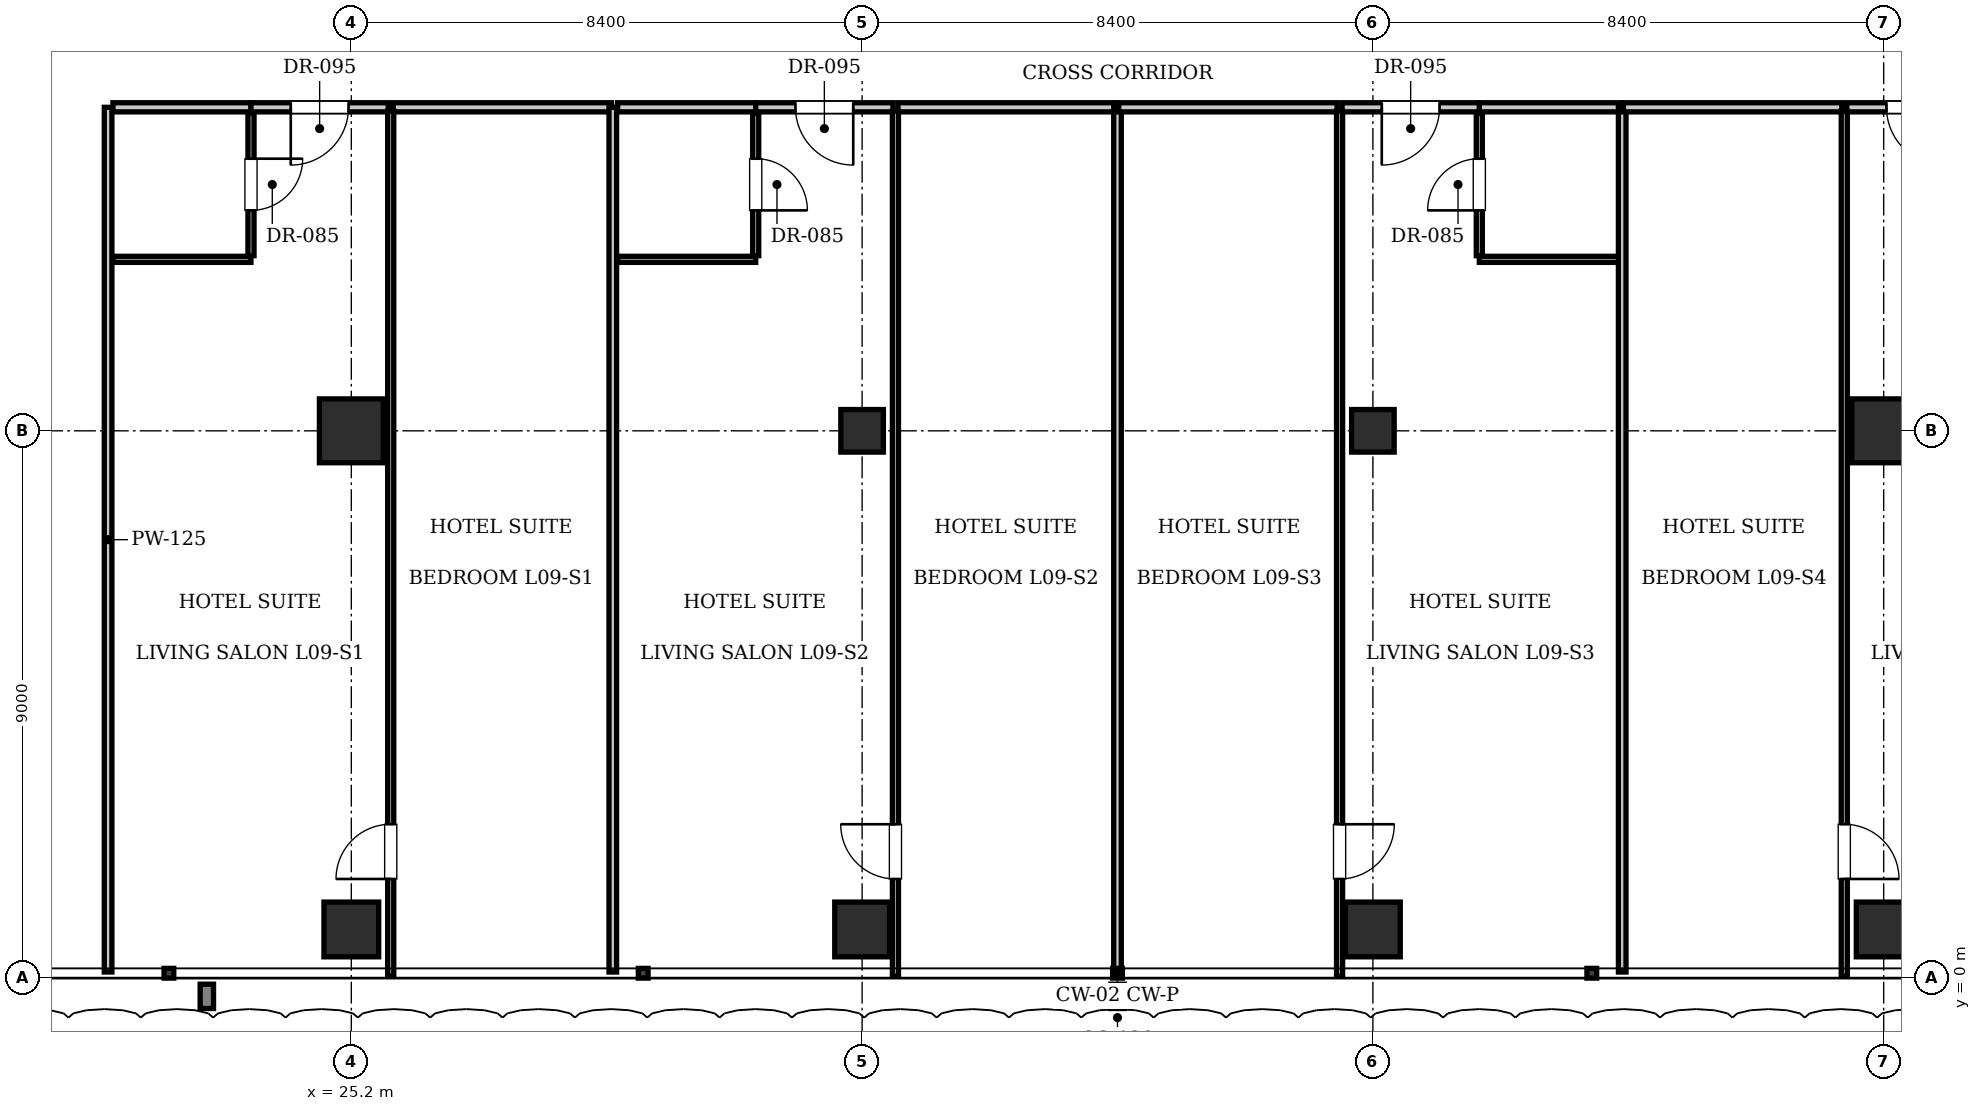
"""IFC4 building model, lengths in metres.
Left out: names, types, materials, properties, quantities, classifications, styles, units other than length and angle.
Written with IfcOpenShell. Run it as: python <this file> out.ifc"""

import sys

from ifc_helpers import new_model, si_unit, direction, frame, frame_2d, origin, origin_2d, place, context, subcontext, project, spatial, rectangle, i_section, extrude, element, fill, save


model = new_model("IFC4")
c1 = context("Model", 3, precision=1e-05, world=origin(), true_north=direction((0.0, 1.0)))
c2 = subcontext(c1, "Body", "Model", "MODEL_VIEW")
j1 = project(units=[si_unit("LENGTHUNIT", "METRE"), si_unit("PLANEANGLEUNIT", "RADIAN")], contexts=[c1])
p1 = place(None, origin())
s1 = spatial("IfcSite", under=j1, at=p1, CompositionType="ELEMENT")
p2 = place(p1, origin())
s2 = spatial("IfcBuilding", under=s1, at=p2, CompositionType="ELEMENT")
p3 = place(p2, frame((0.0, 0.0, 42.35)))
s3 = spatial("IfcBuildingStorey", under=s2, at=p3, CompositionType="ELEMENT", Elevation=42.35)
for number, where, z_axis, x_axis in (
    (1, (25.2, 9.0, 0.0), (0.0, 0.0, 1.0), (1.0, 0.0, 0.0)),
    (2, (50.4, 9.0, 0.0), (0.0, 0.0, 1.0), (1.0, 0.0, 0.0)),
):
    element("IfcColumn", number, at=place(p3, frame(where, z_axis=z_axis, x_axis=x_axis)), inside=s3, PredefinedType="COLUMN", context=c2, shape_type="SweptSolid", body=[
        extrude(rectangle(XDim=1.05, YDim=1.05, at=origin_2d()), origin(), (0.0, 0.0, 1.0), 3.85),
    ])
for number, where, z_axis, x_axis in (
    (3, (33.6, 9.0, 0.0), (0.0, 0.0, 1.0), (1.0, 0.0, 0.0)),
    (4, (42.0, 9.0, 0.0), (0.0, 0.0, 1.0), (1.0, 0.0, 0.0)),
):
    element("IfcColumn", number, at=place(p3, frame(where, z_axis=z_axis, x_axis=x_axis)), inside=s3, PredefinedType="COLUMN", context=c2, shape_type="SweptSolid", body=[
        extrude(i_section(OverallWidth=0.7, OverallDepth=0.7, WebThickness=0.028, FlangeThickness=0.044, at=origin_2d()), origin(), (0.0, 0.0, 1.0), 3.85),
    ])
for number, where, z_axis, x_axis in (
    (5, (25.2, 0.8, 0.0), (0.0, 0.0, 1.0), (1.0, 0.0, 0.0)),
    (6, (33.6, 0.8, 0.0), (0.0, 0.0, 1.0), (1.0, 0.0, 0.0)),
    (7, (42.0, 0.8, 0.0), (0.0, 0.0, 1.0), (1.0, 0.0, 0.0)),
    (8, (50.4, 0.8, 0.0), (0.0, 0.0, 1.0), (1.0, 0.0, 0.0)),
):
    element("IfcColumn", number, at=place(p3, frame(where, z_axis=z_axis, x_axis=x_axis)), inside=s3, PredefinedType="COLUMN", context=c2, shape_type="SweptSolid", body=[
        extrude(rectangle(XDim=0.9, YDim=0.9, at=origin_2d()), origin(), (0.0, 0.0, 1.0), 3.85),
    ])
p4 = place(p3, frame((21.2, 0.1, 0.0), z_axis=(0.0, 0.0, 1.0), x_axis=(0.0, 1.0, 0.0)))
e9 = element("IfcWall", 9, at=p4, inside=s3, PredefinedType="PARTITIONING", context=c2, shape_type="SweptSolid", body=[
    extrude(rectangle(XDim=14.22, YDim=0.125, at=frame_2d((7.11, 0.0))), origin(), (0.0, 0.0, 1.0), 3.61),
])
p5 = place(p3, frame((21.28, 14.32, 0.0), z_axis=(0.0, 0.0, 1.0), x_axis=(1.0, 0.0, 0.0)))
e10 = element("IfcWall", 10, at=p5, inside=s3, PredefinedType="PARTITIONING", context=c2, shape_type="SweptSolid", body=[
    extrude(rectangle(XDim=2.27, YDim=0.15, at=frame_2d((1.135, 0.0))), origin(), (0.0, 0.0, 1.0), 3.61),
])
p6 = place(p3, frame((21.28, 11.82, 0.0), z_axis=(0.0, 0.0, 1.0), x_axis=(1.0, 0.0, 0.0)))
e11 = element("IfcWall", 11, at=p6, inside=s3, PredefinedType="PARTITIONING", context=c2, shape_type="SweptSolid", body=[
    extrude(rectangle(XDim=2.27, YDim=0.1, at=frame_2d((1.135, 0.0))), origin(), (0.0, 0.0, 1.0), 3.61),
])
p7 = place(p3, frame((23.55, 11.88, 0.0), z_axis=(0.0, 0.0, 1.0), x_axis=(0.0, 1.0, 0.0)))
e12 = element("IfcWall", 12, at=p7, inside=s3, PredefinedType="PARTITIONING", context=c2, shape_type="SweptSolid", body=[
    extrude(rectangle(XDim=2.34, YDim=0.1, at=frame_2d((1.17, 0.0))), origin(), (0.0, 0.0, 1.0), 3.61),
])
p8 = place(p7, frame((0.745, 0.0, 0.0)))
e13 = element("IfcOpeningElement", 13, at=p8, cuts=e12, PredefinedType="OPENING", context=c2, shape_type="SweptSolid", body=[
    extrude(rectangle(XDim=0.85, YDim=2.1, at=frame_2d((0.425, 1.05))), frame((0.0, 0.06, 0.0), z_axis=(0.0, -1.0, 0.0), x_axis=(1.0, 0.0, 0.0)), (0.0, 0.0, 1.0), 0.12),
])
p9 = place(p3, frame((23.55, 14.32, 0.0), z_axis=(0.0, 0.0, 1.0), x_axis=(1.0, 0.0, 0.0)))
e14 = element("IfcWall", 14, at=p9, inside=s3, PredefinedType="PARTITIONING", context=c2, shape_type="SweptSolid", body=[
    extrude(rectangle(XDim=2.258, YDim=0.15, at=frame_2d((1.129, 0.0))), origin(), (0.0, 0.0, 1.0), 3.61),
])
p10 = place(p9, frame((0.654, 0.0, 0.0)))
e15 = element("IfcOpeningElement", 15, at=p10, cuts=e14, PredefinedType="OPENING", context=c2, shape_type="SweptSolid", body=[
    extrude(rectangle(XDim=0.95, YDim=2.15, at=frame_2d((0.475, 1.075))), frame((0.0, 0.085, 0.0), z_axis=(0.0, -1.0, 0.0), x_axis=(1.0, 0.0, 0.0)), (0.0, 0.0, 1.0), 0.17),
])
p11 = place(p3, frame((25.888, 14.32, 0.0), z_axis=(0.0, 0.0, 1.0), x_axis=(1.0, 0.0, 0.0)))
e16 = element("IfcWall", 16, at=p11, inside=s3, PredefinedType="PARTITIONING", context=c2, shape_type="SweptSolid", body=[
    extrude(rectangle(XDim=3.592, YDim=0.15, at=frame_2d((1.796, 0.0))), origin(), (0.0, 0.0, 1.0), 3.61),
])
p12 = place(p3, frame((25.848, 0.03, 0.0), z_axis=(0.0, 0.0, 1.0), x_axis=(0.0, 1.0, 0.0)))
e17 = element("IfcWall", 17, at=p12, inside=s3, PredefinedType="PARTITIONING", context=c2, shape_type="SweptSolid", body=[
    extrude(rectangle(XDim=14.23, YDim=0.1, at=frame_2d((7.115, 0.0))), origin(), (0.0, 0.0, 1.0), 3.61),
])
p13 = place(p12, frame((1.6, 0.0, 0.0)))
e18 = element("IfcOpeningElement", 18, at=p13, cuts=e17, PredefinedType="OPENING", context=c2, shape_type="SweptSolid", body=[
    extrude(rectangle(XDim=0.9, YDim=2.1, at=frame_2d((0.45, 1.05))), frame((0.0, 0.06, 0.0), z_axis=(0.0, -1.0, 0.0), x_axis=(1.0, 0.0, 0.0)), (0.0, 0.0, 1.0), 0.12),
])
p14 = place(p3, frame((29.5, 0.1, 0.0), z_axis=(0.0, 0.0, 1.0), x_axis=(0.0, 1.0, 0.0)))
e19 = element("IfcWall", 19, at=p14, inside=s3, PredefinedType="PARTITIONING", context=c2, shape_type="SweptSolid", body=[
    extrude(rectangle(XDim=14.22, YDim=0.125, at=frame_2d((7.11, 0.0))), origin(), (0.0, 0.0, 1.0), 3.207),
])
p15 = place(p3, frame((29.58, 14.32, 0.0), z_axis=(0.0, 0.0, 1.0), x_axis=(1.0, 0.0, 0.0)))
e20 = element("IfcWall", 20, at=p15, inside=s3, PredefinedType="PARTITIONING", context=c2, shape_type="SweptSolid", body=[
    extrude(rectangle(XDim=2.27, YDim=0.15, at=frame_2d((1.135, 0.0))), origin(), (0.0, 0.0, 1.0), 3.61),
])
p16 = place(p3, frame((29.58, 11.82, 0.0), z_axis=(0.0, 0.0, 1.0), x_axis=(1.0, 0.0, 0.0)))
e21 = element("IfcWall", 21, at=p16, inside=s3, PredefinedType="PARTITIONING", context=c2, shape_type="SweptSolid", body=[
    extrude(rectangle(XDim=2.27, YDim=0.1, at=frame_2d((1.135, 0.0))), origin(), (0.0, 0.0, 1.0), 3.61),
])
p17 = place(p3, frame((31.85, 11.88, 0.0), z_axis=(0.0, 0.0, 1.0), x_axis=(0.0, 1.0, 0.0)))
e22 = element("IfcWall", 22, at=p17, inside=s3, PredefinedType="PARTITIONING", context=c2, shape_type="SweptSolid", body=[
    extrude(rectangle(XDim=2.34, YDim=0.1, at=frame_2d((1.17, 0.0))), origin(), (0.0, 0.0, 1.0), 3.61),
])
p18 = place(p17, frame((0.745, 0.0, 0.0)))
e23 = element("IfcOpeningElement", 23, at=p18, cuts=e22, PredefinedType="OPENING", context=c2, shape_type="SweptSolid", body=[
    extrude(rectangle(XDim=0.85, YDim=2.1, at=frame_2d((0.425, 1.05))), frame((0.0, 0.06, 0.0), z_axis=(0.0, -1.0, 0.0), x_axis=(1.0, 0.0, 0.0)), (0.0, 0.0, 1.0), 0.12),
])
p19 = place(p3, frame((31.85, 14.32, 0.0), z_axis=(0.0, 0.0, 1.0), x_axis=(1.0, 0.0, 0.0)))
e24 = element("IfcWall", 24, at=p19, inside=s3, PredefinedType="PARTITIONING", context=c2, shape_type="SweptSolid", body=[
    extrude(rectangle(XDim=2.258, YDim=0.15, at=frame_2d((1.129, 0.0))), origin(), (0.0, 0.0, 1.0), 3.61),
])
p20 = place(p19, frame((0.654, 0.0, 0.0)))
e25 = element("IfcOpeningElement", 25, at=p20, cuts=e24, PredefinedType="OPENING", context=c2, shape_type="SweptSolid", body=[
    extrude(rectangle(XDim=0.95, YDim=2.15, at=frame_2d((0.475, 1.075))), frame((0.0, 0.085, 0.0), z_axis=(0.0, -1.0, 0.0), x_axis=(1.0, 0.0, 0.0)), (0.0, 0.0, 1.0), 0.17),
])
p21 = place(p3, frame((34.188, 14.32, 0.0), z_axis=(0.0, 0.0, 1.0), x_axis=(1.0, 0.0, 0.0)))
e26 = element("IfcWall", 26, at=p21, inside=s3, PredefinedType="PARTITIONING", context=c2, shape_type="SweptSolid", body=[
    extrude(rectangle(XDim=3.592, YDim=0.15, at=frame_2d((1.796, 0.0))), origin(), (0.0, 0.0, 1.0), 3.61),
])
p22 = place(p3, frame((34.148, 0.03, 0.0), z_axis=(0.0, 0.0, 1.0), x_axis=(0.0, 1.0, 0.0)))
e27 = element("IfcWall", 27, at=p22, inside=s3, PredefinedType="PARTITIONING", context=c2, shape_type="SweptSolid", body=[
    extrude(rectangle(XDim=14.23, YDim=0.1, at=frame_2d((7.115, 0.0))), origin(), (0.0, 0.0, 1.0), 3.61),
])
p23 = place(p22, frame((1.6, 0.0, 0.0)))
e28 = element("IfcOpeningElement", 28, at=p23, cuts=e27, PredefinedType="OPENING", context=c2, shape_type="SweptSolid", body=[
    extrude(rectangle(XDim=0.9, YDim=2.1, at=frame_2d((0.45, 1.05))), frame((0.0, 0.06, 0.0), z_axis=(0.0, -1.0, 0.0), x_axis=(1.0, 0.0, 0.0)), (0.0, 0.0, 1.0), 0.12),
])
p24 = place(p3, frame((37.8, 0.1, 0.0), z_axis=(0.0, 0.0, 1.0), x_axis=(0.0, 1.0, 0.0)))
e29 = element("IfcWall", 29, at=p24, inside=s3, PredefinedType="PARTITIONING", context=c2, shape_type="SweptSolid", body=[
    extrude(rectangle(XDim=14.22, YDim=0.125, at=frame_2d((7.11, 0.0))), origin(), (0.0, 0.0, 1.0), 3.255),
])
p25 = place(p3, frame((43.75, 14.32, 0.0), z_axis=(0.0, 0.0, 1.0), x_axis=(1.0, 0.0, 0.0)))
e30 = element("IfcWall", 30, at=p25, inside=s3, PredefinedType="PARTITIONING", context=c2, shape_type="SweptSolid", body=[
    extrude(rectangle(XDim=2.33, YDim=0.15, at=frame_2d((1.165, 0.0))), origin(), (0.0, 0.0, 1.0), 3.61),
])
p26 = place(p3, frame((43.75, 11.82, 0.0), z_axis=(0.0, 0.0, 1.0), x_axis=(1.0, 0.0, 0.0)))
e31 = element("IfcWall", 31, at=p26, inside=s3, PredefinedType="PARTITIONING", context=c2, shape_type="SweptSolid", body=[
    extrude(rectangle(XDim=2.31, YDim=0.1, at=frame_2d((1.155, 0.0))), origin(), (0.0, 0.0, 1.0), 3.61),
])
p27 = place(p3, frame((43.75, 11.88, 0.0), z_axis=(0.0, 0.0, 1.0), x_axis=(0.0, 1.0, 0.0)))
e32 = element("IfcWall", 32, at=p27, inside=s3, PredefinedType="PARTITIONING", context=c2, shape_type="SweptSolid", body=[
    extrude(rectangle(XDim=2.34, YDim=0.1, at=frame_2d((1.17, 0.0))), origin(), (0.0, 0.0, 1.0), 3.61),
])
p28 = place(p27, frame((0.745, 0.0, 0.0)))
e33 = element("IfcOpeningElement", 33, at=p28, cuts=e32, PredefinedType="OPENING", context=c2, shape_type="SweptSolid", body=[
    extrude(rectangle(XDim=0.85, YDim=2.1, at=frame_2d((0.425, 1.05))), frame((0.0, 0.06, 0.0), z_axis=(0.0, -1.0, 0.0), x_axis=(1.0, 0.0, 0.0)), (0.0, 0.0, 1.0), 0.12),
])
p29 = place(p3, frame((37.82, 14.32, 0.0), z_axis=(0.0, 0.0, 1.0), x_axis=(1.0, 0.0, 0.0)))
e34 = element("IfcWall", 34, at=p29, inside=s3, PredefinedType="PARTITIONING", context=c2, shape_type="SweptSolid", body=[
    extrude(rectangle(XDim=3.592, YDim=0.15, at=frame_2d((1.796, 0.0))), origin(), (0.0, 0.0, 1.0), 3.61),
])
p30 = place(p3, frame((41.492, 14.32, 0.0), z_axis=(0.0, 0.0, 1.0), x_axis=(1.0, 0.0, 0.0)))
e35 = element("IfcWall", 35, at=p30, inside=s3, PredefinedType="PARTITIONING", context=c2, shape_type="SweptSolid", body=[
    extrude(rectangle(XDim=2.258, YDim=0.15, at=frame_2d((1.129, 0.0))), origin(), (0.0, 0.0, 1.0), 3.61),
])
p31 = place(p30, frame((0.654, 0.0, 0.0)))
e36 = element("IfcOpeningElement", 36, at=p31, cuts=e35, PredefinedType="OPENING", context=c2, shape_type="SweptSolid", body=[
    extrude(rectangle(XDim=0.95, YDim=2.15, at=frame_2d((0.475, 1.075))), frame((0.0, 0.085, 0.0), z_axis=(0.0, -1.0, 0.0), x_axis=(1.0, 0.0, 0.0)), (0.0, 0.0, 1.0), 0.17),
])
p32 = place(p3, frame((41.452, 0.03, 0.0), z_axis=(0.0, 0.0, 1.0), x_axis=(0.0, 1.0, 0.0)))
e37 = element("IfcWall", 37, at=p32, inside=s3, PredefinedType="PARTITIONING", context=c2, shape_type="SweptSolid", body=[
    extrude(rectangle(XDim=14.23, YDim=0.1, at=frame_2d((7.115, 0.0))), origin(), (0.0, 0.0, 1.0), 3.61),
])
p33 = place(p32, frame((1.6, 0.0, 0.0)))
e38 = element("IfcOpeningElement", 38, at=p33, cuts=e37, PredefinedType="OPENING", context=c2, shape_type="SweptSolid", body=[
    extrude(rectangle(XDim=0.9, YDim=2.1, at=frame_2d((0.45, 1.05))), frame((0.0, 0.06, 0.0), z_axis=(0.0, -1.0, 0.0), x_axis=(1.0, 0.0, 0.0)), (0.0, 0.0, 1.0), 0.12),
])
p34 = place(p3, frame((46.1, 0.1, 0.0), z_axis=(0.0, 0.0, 1.0), x_axis=(0.0, 1.0, 0.0)))
e39 = element("IfcWall", 39, at=p34, inside=s3, PredefinedType="PARTITIONING", context=c2, shape_type="SweptSolid", body=[
    extrude(rectangle(XDim=14.22, YDim=0.125, at=frame_2d((7.11, 0.0))), origin(), (0.0, 0.0, 1.0), 3.293),
])
p35 = place(p3, frame((46.12, 14.32, 0.0), z_axis=(0.0, 0.0, 1.0), x_axis=(1.0, 0.0, 0.0)))
e40 = element("IfcWall", 40, at=p35, inside=s3, PredefinedType="PARTITIONING", context=c2, shape_type="SweptSolid", body=[
    extrude(rectangle(XDim=3.592, YDim=0.15, at=frame_2d((1.796, 0.0))), origin(), (0.0, 0.0, 1.0), 3.61),
])
p36 = place(p3, frame((49.792, 14.32, 0.0), z_axis=(0.0, 0.0, 1.0), x_axis=(1.0, 0.0, 0.0)))
e41 = element("IfcWall", 41, at=p36, inside=s3, PredefinedType="PARTITIONING", context=c2, shape_type="SweptSolid", body=[
    extrude(rectangle(XDim=2.258, YDim=0.15, at=frame_2d((1.129, 0.0))), origin(), (0.0, 0.0, 1.0), 3.61),
])
p37 = place(p36, frame((0.654, 0.0, 0.0)))
e42 = element("IfcOpeningElement", 42, at=p37, cuts=e41, PredefinedType="OPENING", context=c2, shape_type="SweptSolid", body=[
    extrude(rectangle(XDim=0.95, YDim=2.15, at=frame_2d((0.475, 1.075))), frame((0.0, 0.085, 0.0), z_axis=(0.0, -1.0, 0.0), x_axis=(1.0, 0.0, 0.0)), (0.0, 0.0, 1.0), 0.17),
])
p38 = place(p3, frame((49.752, 0.03, 0.0), z_axis=(0.0, 0.0, 1.0), x_axis=(0.0, 1.0, 0.0)))
e43 = element("IfcWall", 43, at=p38, inside=s3, PredefinedType="PARTITIONING", context=c2, shape_type="SweptSolid", body=[
    extrude(rectangle(XDim=14.23, YDim=0.1, at=frame_2d((7.115, 0.0))), origin(), (0.0, 0.0, 1.0), 3.61),
])
p39 = place(p38, frame((1.6, 0.0, 0.0)))
e44 = element("IfcOpeningElement", 44, at=p39, cuts=e43, PredefinedType="OPENING", context=c2, shape_type="SweptSolid", body=[
    extrude(rectangle(XDim=0.9, YDim=2.1, at=frame_2d((0.45, 1.05))), frame((0.0, 0.06, 0.0), z_axis=(0.0, -1.0, 0.0), x_axis=(1.0, 0.0, 0.0)), (0.0, 0.0, 1.0), 0.12),
])
p40 = place(p8, frame((0.85, 0.0, 0.0), z_axis=(0.0, 0.0, 1.0), x_axis=(-1.0, 0.0, 0.0)))
e45 = element("IfcDoor", 45, at=p40, inside=s3, OperationType="SINGLE_SWING_LEFT", PredefinedType="DOOR", context=c2, shape_type="SweptSolid", body=[
    extrude(rectangle(XDim=0.85, YDim=2.1, at=frame_2d((0.425, 1.05))), frame((0.0, 0.025, 0.0), z_axis=(0.0, -1.0, 0.0), x_axis=(1.0, 0.0, 0.0)), (0.0, 0.0, 1.0), 0.05),
])
fill(e13, e45)
p41 = place(p10, frame((0.95, 0.0, 0.0), z_axis=(0.0, 0.0, 1.0), x_axis=(-1.0, 0.0, 0.0)))
e46 = element("IfcDoor", 46, at=p41, inside=s3, OperationType="SINGLE_SWING_RIGHT", PredefinedType="DOOR", context=c2, shape_type="SweptSolid", body=[
    extrude(rectangle(XDim=0.95, YDim=2.15, at=frame_2d((0.475, 1.075))), frame((0.0, 0.025, 0.0), z_axis=(0.0, -1.0, 0.0), x_axis=(1.0, 0.0, 0.0)), (0.0, 0.0, 1.0), 0.05),
])
fill(e15, e46)
p42 = place(p13, origin())
e47 = element("IfcDoor", 47, at=p42, inside=s3, OperationType="SINGLE_SWING_LEFT", PredefinedType="DOOR", context=c2, shape_type="SweptSolid", body=[
    extrude(rectangle(XDim=0.9, YDim=2.1, at=frame_2d((0.45, 1.05))), frame((0.0, 0.025, 0.0), z_axis=(0.0, -1.0, 0.0), x_axis=(1.0, 0.0, 0.0)), (0.0, 0.0, 1.0), 0.05),
])
fill(e18, e47)
p43 = place(p18, frame((0.85, 0.0, 0.0), z_axis=(0.0, 0.0, 1.0), x_axis=(-1.0, 0.0, 0.0)))
e48 = element("IfcDoor", 48, at=p43, inside=s3, OperationType="SINGLE_SWING_RIGHT", PredefinedType="DOOR", context=c2, shape_type="SweptSolid", body=[
    extrude(rectangle(XDim=0.85, YDim=2.1, at=frame_2d((0.425, 1.05))), frame((0.0, 0.025, 0.0), z_axis=(0.0, -1.0, 0.0), x_axis=(1.0, 0.0, 0.0)), (0.0, 0.0, 1.0), 0.05),
])
fill(e23, e48)
p44 = place(p20, frame((0.95, 0.0, 0.0), z_axis=(0.0, 0.0, 1.0), x_axis=(-1.0, 0.0, 0.0)))
e49 = element("IfcDoor", 49, at=p44, inside=s3, OperationType="SINGLE_SWING_LEFT", PredefinedType="DOOR", context=c2, shape_type="SweptSolid", body=[
    extrude(rectangle(XDim=0.95, YDim=2.15, at=frame_2d((0.475, 1.075))), frame((0.0, 0.025, 0.0), z_axis=(0.0, -1.0, 0.0), x_axis=(1.0, 0.0, 0.0)), (0.0, 0.0, 1.0), 0.05),
])
fill(e25, e49)
p45 = place(p23, origin())
e50 = element("IfcDoor", 50, at=p45, inside=s3, OperationType="SINGLE_SWING_RIGHT", PredefinedType="DOOR", context=c2, shape_type="SweptSolid", body=[
    extrude(rectangle(XDim=0.9, YDim=2.1, at=frame_2d((0.45, 1.05))), frame((0.0, 0.025, 0.0), z_axis=(0.0, -1.0, 0.0), x_axis=(1.0, 0.0, 0.0)), (0.0, 0.0, 1.0), 0.05),
])
fill(e28, e50)
p46 = place(p28, origin())
e51 = element("IfcDoor", 51, at=p46, inside=s3, OperationType="SINGLE_SWING_LEFT", PredefinedType="DOOR", context=c2, shape_type="SweptSolid", body=[
    extrude(rectangle(XDim=0.85, YDim=2.1, at=frame_2d((0.425, 1.05))), frame((0.0, 0.025, 0.0), z_axis=(0.0, -1.0, 0.0), x_axis=(1.0, 0.0, 0.0)), (0.0, 0.0, 1.0), 0.05),
])
fill(e33, e51)
p47 = place(p31, frame((0.95, 0.0, 0.0), z_axis=(0.0, 0.0, 1.0), x_axis=(-1.0, 0.0, 0.0)))
e52 = element("IfcDoor", 52, at=p47, inside=s3, OperationType="SINGLE_SWING_RIGHT", PredefinedType="DOOR", context=c2, shape_type="SweptSolid", body=[
    extrude(rectangle(XDim=0.95, YDim=2.15, at=frame_2d((0.475, 1.075))), frame((0.0, 0.025, 0.0), z_axis=(0.0, -1.0, 0.0), x_axis=(1.0, 0.0, 0.0)), (0.0, 0.0, 1.0), 0.05),
])
fill(e36, e52)
p48 = place(p33, frame((0.9, 0.0, 0.0), z_axis=(0.0, 0.0, 1.0), x_axis=(-1.0, 0.0, 0.0)))
e53 = element("IfcDoor", 53, at=p48, inside=s3, OperationType="SINGLE_SWING_LEFT", PredefinedType="DOOR", context=c2, shape_type="SweptSolid", body=[
    extrude(rectangle(XDim=0.9, YDim=2.1, at=frame_2d((0.45, 1.05))), frame((0.0, 0.025, 0.0), z_axis=(0.0, -1.0, 0.0), x_axis=(1.0, 0.0, 0.0)), (0.0, 0.0, 1.0), 0.05),
])
fill(e38, e53)
p49 = place(p37, frame((0.95, 0.0, 0.0), z_axis=(0.0, 0.0, 1.0), x_axis=(-1.0, 0.0, 0.0)))
e54 = element("IfcDoor", 54, at=p49, inside=s3, OperationType="SINGLE_SWING_LEFT", PredefinedType="DOOR", context=c2, shape_type="SweptSolid", body=[
    extrude(rectangle(XDim=0.95, YDim=2.15, at=frame_2d((0.475, 1.075))), frame((0.0, 0.025, 0.0), z_axis=(0.0, -1.0, 0.0), x_axis=(1.0, 0.0, 0.0)), (0.0, 0.0, 1.0), 0.05),
])
fill(e42, e54)
p50 = place(p39, frame((0.9, 0.0, 0.0), z_axis=(0.0, 0.0, 1.0), x_axis=(-1.0, 0.0, 0.0)))
e55 = element("IfcDoor", 55, at=p50, inside=s3, OperationType="SINGLE_SWING_RIGHT", PredefinedType="DOOR", context=c2, shape_type="SweptSolid", body=[
    extrude(rectangle(XDim=0.9, YDim=2.1, at=frame_2d((0.45, 1.05))), frame((0.0, 0.025, 0.0), z_axis=(0.0, -1.0, 0.0), x_axis=(1.0, 0.0, 0.0)), (0.0, 0.0, 1.0), 0.05),
])
fill(e44, e55)
save(model, sys.argv[1])
